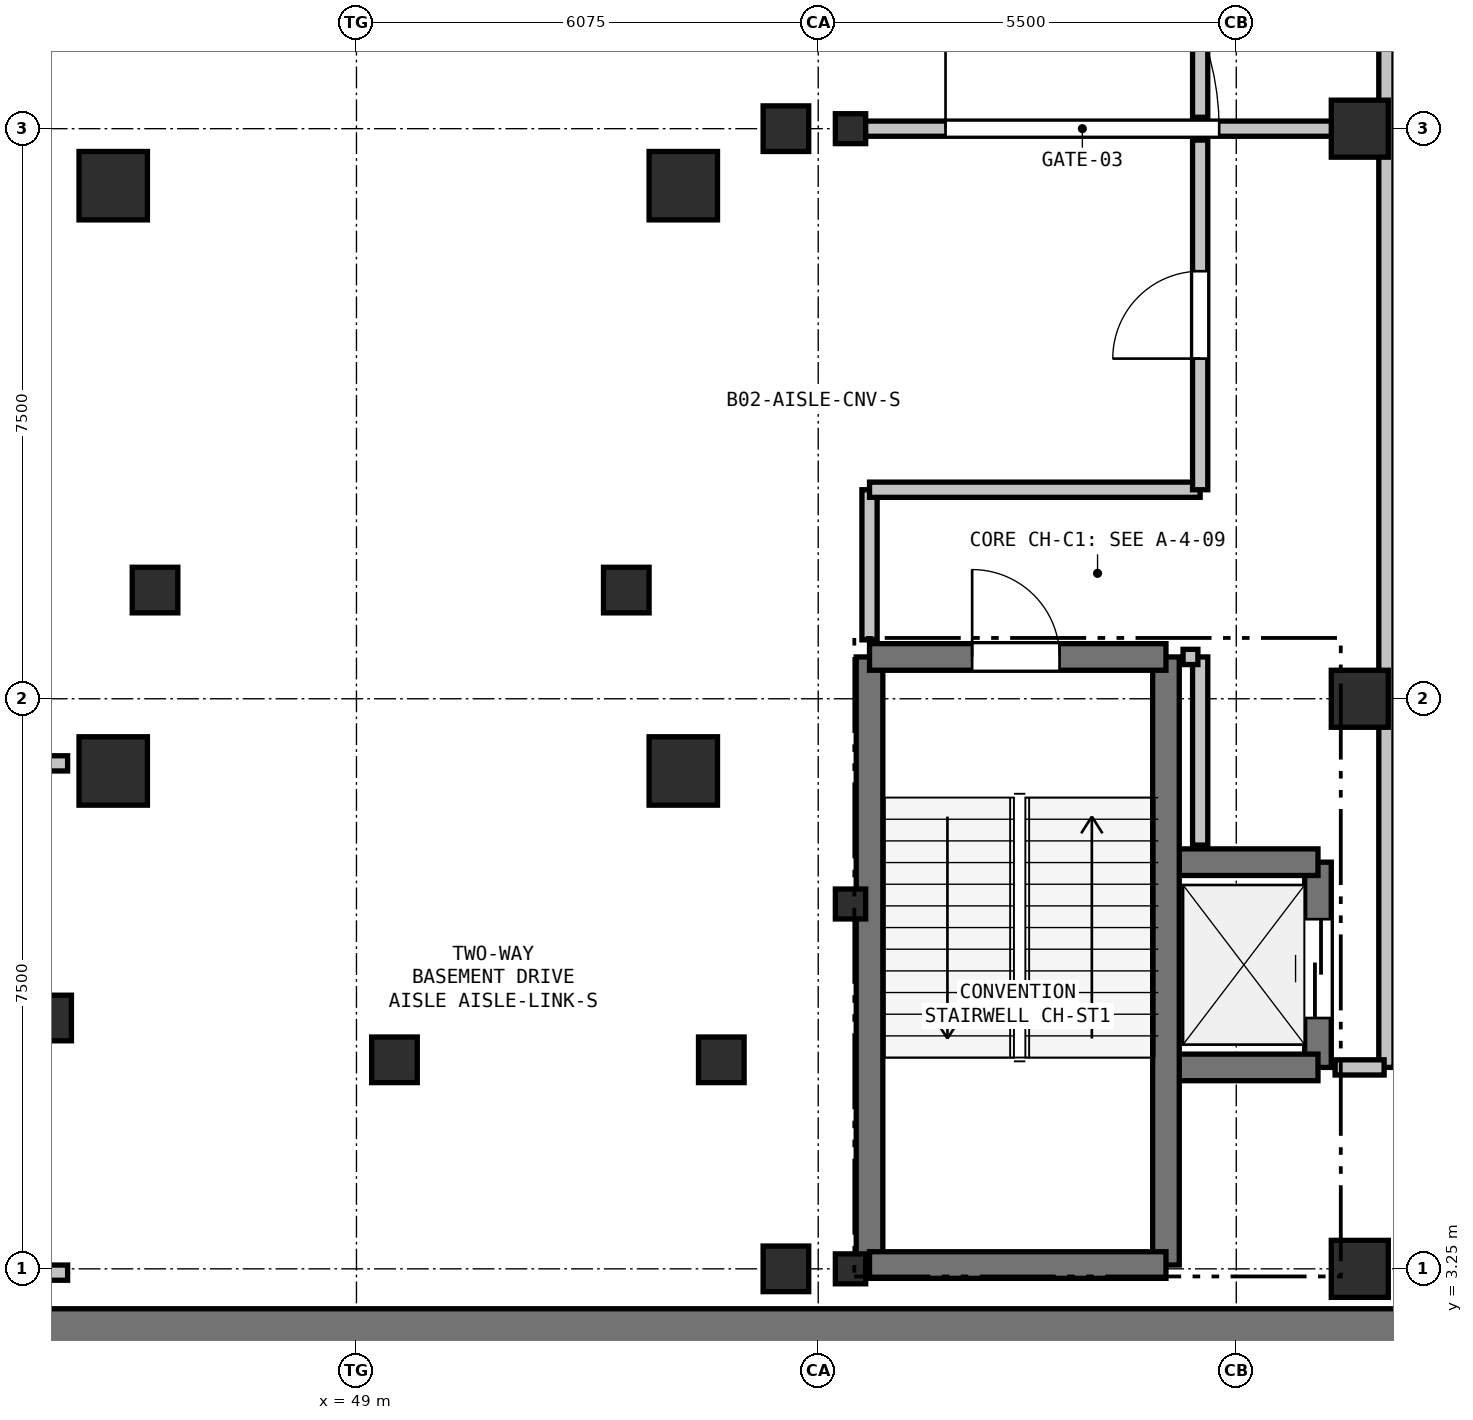
"""IFC4 building model, lengths in metres.
Left out: names, types, materials, properties, quantities, classifications, styles, units other than length and angle.
Written with IfcOpenShell. Run it as: python <this file> out.ifc"""

import sys

from ifc_helpers import new_model, si_unit, direction, frame, frame_2d, origin, origin_2d, place, context, subcontext, project, spatial, rectangle, i_section, extrude, element, fill, save


model = new_model("IFC4")
c1 = context("Model", 3, precision=1e-05, world=origin(), true_north=direction((0.0, 1.0)))
c2 = subcontext(c1, "Body", "Model", "MODEL_VIEW")
j1 = project(units=[si_unit("LENGTHUNIT", "METRE"), si_unit("PLANEANGLEUNIT", "RADIAN")], contexts=[c1])
p1 = place(None, origin())
s1 = spatial("IfcSite", under=j1, at=p1, CompositionType="ELEMENT")
p2 = place(p1, origin())
s2 = spatial("IfcBuilding", under=s1, at=p2, CompositionType="ELEMENT")
p3 = place(p2, frame((0.0, 0.0, -9.0)))
s3 = spatial("IfcBuildingStorey", under=s2, at=p3, CompositionType="ELEMENT", Elevation=-9.0)
p4 = place(p3, frame((-4.5, 2.5, 0.0), z_axis=(0.0, 0.0, 1.0), x_axis=(1.0, 0.0, 0.0)))
e1 = element("IfcWall", 1, at=p4, inside=s3, PredefinedType="USERDEFINED", context=c2, shape_type="SweptSolid", body=[
    extrude(rectangle(XDim=81.5, YDim=0.45, at=frame_2d((40.75, 0.0))), origin(), (0.0, 0.0, 1.0), 4.5),
])
for number, where, z_axis, x_axis in (
    (2, (49.5, 6.0, 0.0), (0.0, 0.0, 1.0), (1.0, 0.0, 0.0)),
    (3, (53.8, 6.0, 0.0), (0.0, 0.0, 1.0), (1.0, 0.0, 0.0)),
):
    element("IfcColumn", number, at=place(p3, frame(where, z_axis=z_axis, x_axis=x_axis)), inside=s3, PredefinedType="COLUMN", context=c2, shape_type="SweptSolid", body=[
        extrude(rectangle(XDim=0.6, YDim=0.6, at=origin_2d()), origin(), (0.0, 0.0, 1.0), 4.5),
    ])
for number, where, z_axis, x_axis in (
    (4, (45.8, 9.8, 0.0), (0.0, 0.0, 1.0), (1.0, 0.0, 0.0)),
    (5, (45.8, 17.5, 0.0), (0.0, 0.0, 1.0), (1.0, 0.0, 0.0)),
    (6, (53.3, 9.8, 0.0), (0.0, 0.0, 1.0), (1.0, 0.0, 0.0)),
    (7, (53.3, 17.5, 0.0), (0.0, 0.0, 1.0), (1.0, 0.0, 0.0)),
):
    element("IfcColumn", number, at=place(p3, frame(where, z_axis=z_axis, x_axis=x_axis)), inside=s3, PredefinedType="COLUMN", context=c2, shape_type="SweptSolid", body=[
        extrude(rectangle(XDim=0.9, YDim=0.9, at=origin_2d()), origin(), (0.0, 0.0, 1.0), 4.5),
    ])
for number, where, z_axis, x_axis in (
    (8, (54.65, 3.25, 0.0), (0.0, 0.0, 1.0), (1.0, 0.0, 0.0)),
    (9, (54.65, 18.25, 0.0), (0.0, 0.0, 1.0), (1.0, 0.0, 0.0)),
    (10, (44.95, 6.55, 0.0), (0.0, 0.0, 1.0), (1.0, 0.0, 0.0)),
):
    element("IfcColumn", number, at=place(p3, frame(where, z_axis=z_axis, x_axis=x_axis)), inside=s3, PredefinedType="COLUMN", context=c2, shape_type="SweptSolid", body=[
        extrude(rectangle(XDim=0.6, YDim=0.6, at=origin_2d()), origin(), (0.0, 0.0, 1.0), 4.2),
    ])
for number, where, z_axis, x_axis in (
    (11, (46.35, 12.18, 0.0), (0.0, 0.0, 1.0), (1.0, 0.0, 0.0)),
    (12, (52.55, 12.18, 0.0), (0.0, 0.0, 1.0), (1.0, 0.0, 0.0)),
):
    element("IfcColumn", number, at=place(p3, frame(where, z_axis=z_axis, x_axis=x_axis)), inside=s3, PredefinedType="COLUMN", context=c2, shape_type="SweptSolid", body=[
        extrude(rectangle(XDim=0.6, YDim=0.6, at=origin_2d()), origin(), (0.0, 0.0, 1.0), 3.82),
    ])
for number, where, z_axis, x_axis in (
    (13, (55.5, 3.25, 0.0), (0.0, 0.0, 1.0), (1.0, 0.0, 0.0)),
    (14, (55.5, 8.05, 0.0), (0.0, 0.0, 1.0), (1.0, 0.0, 0.0)),
    (15, (55.5, 18.25, 0.0), (0.0, 0.0, 1.0), (1.0, 0.0, 0.0)),
):
    element("IfcColumn", number, at=place(p3, frame(where, z_axis=z_axis, x_axis=x_axis)), inside=s3, PredefinedType="COLUMN", context=c2, shape_type="SweptSolid", body=[
        extrude(i_section(OverallWidth=0.399, OverallDepth=0.394, WebThickness=0.023, FlangeThickness=0.037, at=origin_2d()), origin(), (0.0, 0.0, 1.0), 4.5),
    ])
for number, where, z_axis, x_axis in (
    (16, (62.2, 3.25, 0.0), (0.0, 0.0, 1.0), (1.0, 0.0, 0.0)),
    (17, (62.2, 10.75, 0.0), (0.0, 0.0, 1.0), (1.0, 0.0, 0.0)),
    (18, (62.2, 18.25, 0.0), (0.0, 0.0, 1.0), (1.0, 0.0, 0.0)),
):
    element("IfcColumn", number, at=place(p3, frame(where, z_axis=z_axis, x_axis=x_axis)), inside=s3, PredefinedType="COLUMN", context=c2, shape_type="SweptSolid", body=[
        extrude(rectangle(XDim=0.75, YDim=0.75, at=origin_2d()), origin(), (0.0, 0.0, 1.0), 4.5),
    ])
for number, where, z_axis, x_axis in (
    (19, (11.85, 9.9, 0.0), (0.0, 0.0, 1.0), (1.0, 0.0, 0.0)),
    (20, (45.2, 3.2, 0.0), (0.0, 0.0, 1.0), (-1.0, 0.0, 0.0)),
):
    element("IfcWall", number, at=place(p3, frame(where, z_axis=z_axis, x_axis=x_axis)), inside=s3, PredefinedType="PARAPET", context=c2, shape_type="SweptSolid", body=[
        extrude(rectangle(XDim=33.35, YDim=0.2, at=frame_2d((16.675, 0.0))), origin(), (0.0, 0.0, 1.0), 5.75),
    ])
p5 = place(p3, frame((61.65, 5.9, 0.0), z_axis=(0.0, 0.0, 1.0), x_axis=(0.0, 1.0, 0.0)))
e21 = element("IfcWall", 21, at=p5, inside=s3, PredefinedType="SHEAR", context=c2, shape_type="SweptSolid", body=[
    extrude(rectangle(XDim=2.7, YDim=0.35, at=frame_2d((1.35, 0.0))), origin(), (0.0, 0.0, 1.0), 4.2),
])
p6 = place(p5, frame((0.65, 0.0, 0.0)))
e22 = element("IfcOpeningElement", 22, at=p6, cuts=e21, PredefinedType="OPENING", context=c2, shape_type="SweptSolid", body=[
    extrude(rectangle(XDim=1.3, YDim=2.2, at=frame_2d((0.65, 1.1))), frame((0.0, 0.185, 0.0), z_axis=(0.0, -1.0, 0.0), x_axis=(1.0, 0.0, 0.0)), (0.0, 0.0, 1.0), 0.37),
])
for number, where, z_axis, x_axis in (
    (23, (59.65, 8.6, 0.0), (0.0, 0.0, 1.0), (1.0, 0.0, 0.0)),
    (24, (59.65, 5.9, 0.0), (0.0, 0.0, 1.0), (1.0, 0.0, 0.0)),
):
    element("IfcWall", number, at=place(p3, frame(where, z_axis=z_axis, x_axis=x_axis)), inside=s3, PredefinedType="SHEAR", context=c2, shape_type="SweptSolid", body=[
        extrude(rectangle(XDim=2.0, YDim=0.35, at=frame_2d((1.0, 0.0))), origin(), (0.0, 0.0, 1.0), 4.2),
    ])
for number, where, z_axis, x_axis in (
    (25, (59.65, 11.3, 0.0), (0.0, 0.0, 1.0), (0.0, -1.0, 0.0)),
    (26, (55.75, 3.3, 0.0), (0.0, 0.0, 1.0), (0.0, 1.0, 0.0)),
):
    element("IfcWall", number, at=place(p3, frame(where, z_axis=z_axis, x_axis=x_axis)), inside=s3, PredefinedType="SHEAR", context=c2, shape_type="SweptSolid", body=[
        extrude(rectangle(XDim=8.0, YDim=0.35, at=frame_2d((4.0, 0.0))), origin(), (0.0, 0.0, 1.0), 4.2),
    ])
p7 = place(p3, frame((55.75, 11.3, 0.0), z_axis=(0.0, 0.0, 1.0), x_axis=(1.0, 0.0, 0.0)))
e27 = element("IfcWall", 27, at=p7, inside=s3, PredefinedType="SHEAR", context=c2, shape_type="SweptSolid", body=[
    extrude(rectangle(XDim=3.9, YDim=0.35, at=frame_2d((1.95, 0.0))), origin(), (0.0, 0.0, 1.0), 4.2),
])
p8 = place(p7, frame((1.35, 0.0, 0.0)))
e28 = element("IfcOpeningElement", 28, at=p8, cuts=e27, PredefinedType="OPENING", context=c2, shape_type="SweptSolid", body=[
    extrude(rectangle(XDim=1.15, YDim=2.15, at=frame_2d((0.575, 1.075))), frame((0.0, 0.185, 0.0), z_axis=(0.0, -1.0, 0.0), x_axis=(1.0, 0.0, 0.0)), (0.0, 0.0, 1.0), 0.37),
])
p9 = place(p3, frame((55.75, 3.3, 0.0), z_axis=(0.0, 0.0, 1.0), x_axis=(1.0, 0.0, 0.0)))
e29 = element("IfcWall", 29, at=p9, inside=s3, PredefinedType="SHEAR", context=c2, shape_type="SweptSolid", body=[
    extrude(rectangle(XDim=3.9, YDim=0.35, at=frame_2d((1.95, 0.0))), origin(), (0.0, 0.0, 1.0), 4.2),
])
p10 = place(p3, frame((55.5, 18.25, 0.0), z_axis=(0.0, 0.0, 1.0), x_axis=(1.0, 0.0, 0.0)))
e30 = element("IfcWall", 30, at=p10, inside=s3, PredefinedType="PARTITIONING", context=c2, shape_type="SweptSolid", body=[
    extrude(rectangle(XDim=6.7, YDim=0.2, at=frame_2d((3.35, 0.0))), origin(), (0.0, 0.0, 1.0), 4.2),
])
p11 = place(p10, frame((1.25, 0.0, 0.0)))
e31 = element("IfcOpeningElement", 31, at=p11, cuts=e30, PredefinedType="OPENING", context=c2, shape_type="SweptSolid", body=[
    extrude(rectangle(XDim=3.6, YDim=2.8, at=frame_2d((1.8, 1.4))), frame((0.0, 0.11, 0.0), z_axis=(0.0, -1.0, 0.0), x_axis=(1.0, 0.0, 0.0)), (0.0, 0.0, 1.0), 0.22),
])
p12 = place(p3, frame((62.55, 19.5, 0.0), z_axis=(0.0, 0.0, 1.0), x_axis=(0.0, -1.0, 0.0)))
e32 = element("IfcWall", 32, at=p12, inside=s3, PredefinedType="PARTITIONING", context=c2, shape_type="SweptSolid", body=[
    extrude(rectangle(XDim=13.6, YDim=0.2, at=frame_2d((6.8, 0.0))), origin(), (0.0, 0.0, 1.0), 4.2),
])
p13 = place(p3, frame((62.52, 5.9, 0.0), z_axis=(0.0, 0.0, 1.0), x_axis=(-1.0, 0.0, 0.0)))
e33 = element("IfcWall", 33, at=p13, inside=s3, PredefinedType="PARTITIONING", context=c2, shape_type="SweptSolid", body=[
    extrude(rectangle(XDim=0.645, YDim=0.2, at=frame_2d((0.323, 0.0))), origin(), (0.0, 0.0, 1.0), 4.2),
])
p14 = place(p3, frame((60.1, 8.825, 0.0), z_axis=(0.0, 0.0, 1.0), x_axis=(0.0, 1.0, 0.0)))
e34 = element("IfcWall", 34, at=p14, inside=s3, PredefinedType="PARTITIONING", context=c2, shape_type="SweptSolid", body=[
    extrude(rectangle(XDim=2.475, YDim=0.2, at=frame_2d((1.238, 0.0))), origin(), (0.0, 0.0, 1.0), 4.2),
])
p15 = place(p3, frame((60.07, 11.3, 0.0), z_axis=(0.0, 0.0, 1.0), x_axis=(-1.0, 0.0, 0.0)))
e35 = element("IfcWall", 35, at=p15, inside=s3, PredefinedType="PARTITIONING", context=c2, shape_type="SweptSolid", body=[
    extrude(rectangle(XDim=0.195, YDim=0.2, at=frame_2d((0.098, 0.0))), origin(), (0.0, 0.0, 1.0), 4.2),
])
p16 = place(p3, frame((55.75, 11.525, 0.0), z_axis=(0.0, 0.0, 1.0), x_axis=(0.0, 1.0, 0.0)))
e36 = element("IfcWall", 36, at=p16, inside=s3, PredefinedType="PARTITIONING", context=c2, shape_type="SweptSolid", body=[
    extrude(rectangle(XDim=1.975, YDim=0.2, at=frame_2d((0.988, 0.0))), origin(), (0.0, 0.0, 1.0), 4.2),
])
p17 = place(p3, frame((55.75, 13.5, 0.0), z_axis=(0.0, 0.0, 1.0), x_axis=(1.0, 0.0, 0.0)))
e37 = element("IfcWall", 37, at=p17, inside=s3, PredefinedType="PARTITIONING", context=c2, shape_type="SweptSolid", body=[
    extrude(rectangle(XDim=4.35, YDim=0.2, at=frame_2d((2.175, 0.0))), origin(), (0.0, 0.0, 1.0), 4.2),
])
p18 = place(p3, frame((60.1, 13.5, 0.0), z_axis=(0.0, 0.0, 1.0), x_axis=(0.0, 1.0, 0.0)))
e38 = element("IfcWall", 38, at=p18, inside=s3, PredefinedType="PARTITIONING", context=c2, shape_type="SweptSolid", body=[
    extrude(rectangle(XDim=4.6, YDim=0.2, at=frame_2d((2.3, 0.0))), origin(), (0.0, 0.0, 1.0), 4.2),
])
p19 = place(p18, frame((1.725, 0.0, 0.0)))
e39 = element("IfcOpeningElement", 39, at=p19, cuts=e38, PredefinedType="OPENING", context=c2, shape_type="SweptSolid", body=[
    extrude(rectangle(XDim=1.15, YDim=2.15, at=frame_2d((0.575, 1.075))), frame((0.0, 0.11, 0.0), z_axis=(0.0, -1.0, 0.0), x_axis=(1.0, 0.0, 0.0)), (0.0, 0.0, 1.0), 0.22),
])
p20 = place(p3, frame((60.1, 18.4, 0.0), z_axis=(0.0, 0.0, 1.0), x_axis=(0.0, 1.0, 0.0)))
e40 = element("IfcWall", 40, at=p20, inside=s3, PredefinedType="PARTITIONING", context=c2, shape_type="SweptSolid", body=[
    extrude(rectangle(XDim=14.7, YDim=0.2, at=frame_2d((7.35, 0.0))), origin(), (0.0, 0.0, 1.0), 4.2),
])
p21 = place(p20, frame((6.775, 0.0, 0.0)))
e41 = element("IfcOpeningElement", 41, at=p21, cuts=e40, PredefinedType="OPENING", context=c2, shape_type="SweptSolid", body=[
    extrude(rectangle(XDim=1.15, YDim=2.15, at=frame_2d((0.575, 1.075))), frame((0.0, 0.11, 0.0), z_axis=(0.0, -1.0, 0.0), x_axis=(1.0, 0.0, 0.0)), (0.0, 0.0, 1.0), 0.22),
])
p22 = place(p6, origin())
e42 = element("IfcDoor", 42, at=p22, inside=s3, OperationType="SLIDING_TO_LEFT", PredefinedType="DOOR", context=c2, shape_type="SweptSolid", body=[
    extrude(rectangle(XDim=1.3, YDim=2.2, at=frame_2d((0.65, 1.1))), frame((0.0, 0.025, 0.0), z_axis=(0.0, -1.0, 0.0), x_axis=(1.0, 0.0, 0.0)), (0.0, 0.0, 1.0), 0.05),
])
fill(e22, e42)
p23 = place(p8, origin())
e43 = element("IfcDoor", 43, at=p23, inside=s3, OperationType="SINGLE_SWING_LEFT", PredefinedType="DOOR", context=c2, shape_type="SweptSolid", body=[
    extrude(rectangle(XDim=1.15, YDim=2.15, at=frame_2d((0.575, 1.075))), frame((0.0, 0.025, 0.0), z_axis=(0.0, -1.0, 0.0), x_axis=(1.0, 0.0, 0.0)), (0.0, 0.0, 1.0), 0.05),
])
fill(e28, e43)
p24 = place(p11, origin())
e44 = element("IfcDoor", 44, at=p24, inside=s3, OperationType="ROLLINGUP", PredefinedType="GATE", context=c2, shape_type="SweptSolid", body=[
    extrude(rectangle(XDim=3.6, YDim=2.8, at=frame_2d((1.8, 1.4))), frame((0.0, 0.025, 0.0), z_axis=(0.0, -1.0, 0.0), x_axis=(1.0, 0.0, 0.0)), (0.0, 0.0, 1.0), 0.05),
])
fill(e31, e44)
p25 = place(p19, origin())
e45 = element("IfcDoor", 45, at=p25, inside=s3, OperationType="SINGLE_SWING_LEFT", PredefinedType="DOOR", context=c2, shape_type="SweptSolid", body=[
    extrude(rectangle(XDim=1.15, YDim=2.15, at=frame_2d((0.575, 1.075))), frame((0.0, 0.025, 0.0), z_axis=(0.0, -1.0, 0.0), x_axis=(1.0, 0.0, 0.0)), (0.0, 0.0, 1.0), 0.05),
])
fill(e39, e45)
save(model, sys.argv[1])
